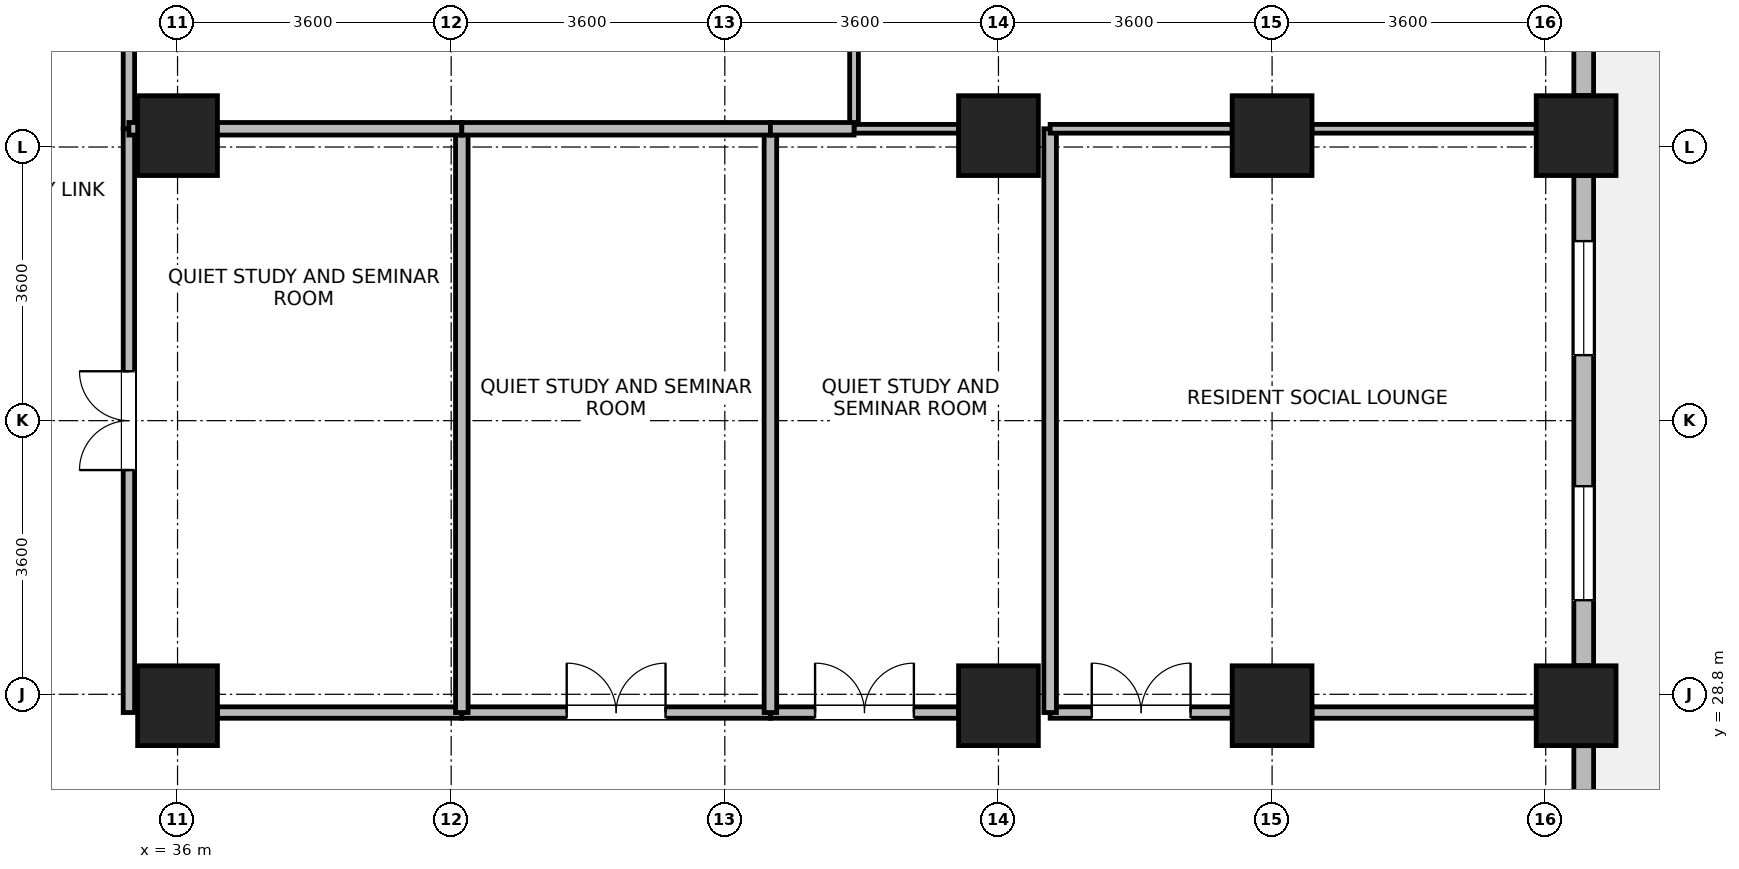
"""IFC4 building model, lengths in metres.
Left out: names, types, materials, properties, quantities, classifications, styles, units other than length and angle.
Written with IfcOpenShell. Run it as: python <this file> out.ifc"""

import sys

from ifc_helpers import new_model, si_unit, direction, frame, frame_2d, origin, origin_2d, place, context, subcontext, project, spatial, rectangle, extrude, source, transform, mapped, element, fill, save


model = new_model("IFC4")
c1 = context("Model", 3, precision=1e-05, world=origin(), true_north=direction((0.0, 1.0)))
c2 = subcontext(c1, "Body", "Model", "MODEL_VIEW")
j1 = project(units=[si_unit("LENGTHUNIT", "METRE"), si_unit("PLANEANGLEUNIT", "RADIAN")], contexts=[c1])
p1 = place(None, origin())
s1 = spatial("IfcSite", under=j1, at=p1, CompositionType="ELEMENT")
p2 = place(p1, origin())
s2 = spatial("IfcBuilding", under=s1, at=p2, CompositionType="ELEMENT")
p3 = place(p2, frame((0.0, 0.0, 166.1)))
s3 = spatial("IfcBuildingStorey", under=s2, at=p3, CompositionType="ELEMENT", Elevation=166.1)
m1 = source(origin(), c2, "Body", "SweptSolid", [
    extrude(rectangle(XDim=1.05, YDim=1.05, at=origin_2d()), origin(), (0.0, 0.0, 1.0), 3.7),
])
for number, where, z_axis, x_axis in (
    (1, (36.0, 28.65, 0.0), (0.0, 0.0, 1.0), (1.0, 0.0, 0.0)),
    (2, (36.0, 36.15, 0.0), (0.0, 0.0, 1.0), (1.0, 0.0, 0.0)),
    (3, (46.8, 28.65, 0.0), (0.0, 0.0, 1.0), (1.0, 0.0, 0.0)),
    (4, (46.8, 36.15, 0.0), (0.0, 0.0, 1.0), (1.0, 0.0, 0.0)),
    (5, (50.4, 28.65, 0.0), (0.0, 0.0, 1.0), (1.0, 0.0, 0.0)),
    (6, (50.4, 36.15, 0.0), (0.0, 0.0, 1.0), (1.0, 0.0, 0.0)),
    (7, (54.4, 28.65, 0.0), (0.0, 0.0, 1.0), (1.0, 0.0, 0.0)),
    (8, (54.4, 36.15, 0.0), (0.0, 0.0, 1.0), (1.0, 0.0, 0.0)),
):
    element("IfcColumn", number, at=place(p3, frame(where, z_axis=z_axis, x_axis=x_axis)), inside=s3, PredefinedType="COLUMN", context=c2, shape_type="MappedRepresentation", body=[
        mapped(m1, transform((0.0, 0.0, 0.0), x_axis=(1.0, 0.0, 0.0), y_axis=(0.0, 1.0, 0.0), z_axis=(0.0, 0.0, 1.0), scale=1.0)),
    ])
p4 = place(p3, frame((54.5, 28.124, 0.0), z_axis=(0.0, 0.0, 1.0), x_axis=(0.0, -1.0, 0.0)))
e9 = element("IfcWall", 9, at=p4, inside=s3, PredefinedType="STANDARD", context=c2, shape_type="SweptSolid", body=[
    extrude(rectangle(XDim=5.998, YDim=0.26, at=frame_2d((2.999, 0.0))), origin(), (0.0, 0.0, 1.0), 2.99),
])
p5 = place(p4, frame((3.749, 0.0, 0.85)))
e10 = element("IfcOpeningElement", 10, at=p5, cuts=e9, PredefinedType="OPENING", context=c2, shape_type="SweptSolid", body=[
    extrude(rectangle(XDim=1.5, YDim=1.85, at=frame_2d((0.75, 0.925))), frame((0.0, 0.14, 0.0), z_axis=(0.0, -1.0, 0.0), x_axis=(1.0, 0.0, 0.0)), (0.0, 0.0, 1.0), 0.28),
])
p6 = place(p4, frame((2.044, 0.0, 0.85)))
e11 = element("IfcOpeningElement", 11, at=p6, cuts=e9, PredefinedType="OPENING", context=c2, shape_type="SweptSolid", body=[
    extrude(rectangle(XDim=0.95, YDim=1.75, at=frame_2d((0.475, 0.875))), frame((0.0, 0.14, 0.0), z_axis=(0.0, -1.0, 0.0), x_axis=(1.0, 0.0, 0.0)), (0.0, 0.0, 1.0), 0.28),
])
p7 = place(p3, frame((54.5, 35.624, 0.0), z_axis=(0.0, 0.0, 1.0), x_axis=(0.0, -1.0, 0.0)))
e12 = element("IfcWall", 12, at=p7, inside=s3, PredefinedType="STANDARD", context=c2, shape_type="SweptSolid", body=[
    extrude(rectangle(XDim=6.448, YDim=0.26, at=frame_2d((3.224, 0.0))), origin(), (0.0, 0.0, 1.0), 2.99),
])
p8 = place(p7, frame((0.862, 0.0, 0.85)))
e13 = element("IfcOpeningElement", 13, at=p8, cuts=e12, PredefinedType="OPENING", context=c2, shape_type="SweptSolid", body=[
    extrude(rectangle(XDim=1.5, YDim=1.85, at=frame_2d((0.75, 0.925))), frame((0.0, 0.14, 0.0), z_axis=(0.0, -1.0, 0.0), x_axis=(1.0, 0.0, 0.0)), (0.0, 0.0, 1.0), 0.28),
])
p9 = place(p7, frame((4.086, 0.0, 0.85)))
e14 = element("IfcOpeningElement", 14, at=p9, cuts=e12, PredefinedType="OPENING", context=c2, shape_type="SweptSolid", body=[
    extrude(rectangle(XDim=1.5, YDim=1.85, at=frame_2d((0.75, 0.925))), frame((0.0, 0.14, 0.0), z_axis=(0.0, -1.0, 0.0), x_axis=(1.0, 0.0, 0.0)), (0.0, 0.0, 1.0), 0.28),
])
p10 = place(p3, frame((54.5, 39.73, 0.0), z_axis=(0.0, 0.0, 1.0), x_axis=(0.0, -1.0, 0.0)))
e15 = element("IfcWall", 15, at=p10, inside=s3, PredefinedType="STANDARD", context=c2, shape_type="SweptSolid", body=[
    extrude(rectangle(XDim=3.054, YDim=0.26, at=frame_2d((1.527, 0.0))), origin(), (0.0, 0.0, 1.0), 3.44),
])
p11 = place(p10, frame((0.777, 0.0, 0.85)))
e16 = element("IfcOpeningElement", 16, at=p11, cuts=e15, PredefinedType="OPENING", context=c2, shape_type="SweptSolid", body=[
    extrude(rectangle(XDim=1.5, YDim=1.85, at=frame_2d((0.75, 0.925))), frame((0.0, 0.14, 0.0), z_axis=(0.0, -1.0, 0.0), x_axis=(1.0, 0.0, 0.0)), (0.0, 0.0, 1.0), 0.28),
])
p12 = place(p3, frame((35.36, 28.56, 0.0), z_axis=(0.0, 0.0, 1.0), x_axis=(0.0, 1.0, 0.0)))
e17 = element("IfcWall", 17, at=p12, inside=s3, PredefinedType="PARTITIONING", context=c2, shape_type="SweptSolid", body=[
    extrude(rectangle(XDim=7.68, YDim=0.15, at=frame_2d((3.84, 0.0))), origin(), (0.0, 0.0, 1.0), 3.44),
])
p13 = place(p12, frame((3.19, 0.0, 0.0)))
e18 = element("IfcOpeningElement", 18, at=p13, cuts=e17, PredefinedType="OPENING", context=c2, shape_type="SweptSolid", body=[
    extrude(rectangle(XDim=1.3, YDim=2.12, at=frame_2d((0.65, 1.06))), frame((0.0, 0.085, 0.0), z_axis=(0.0, -1.0, 0.0), x_axis=(1.0, 0.0, 0.0)), (0.0, 0.0, 1.0), 0.17),
])
p14 = place(p3, frame((47.48, 28.56, 0.0), z_axis=(0.0, 0.0, 1.0), x_axis=(1.0, 0.0, 0.0)))
e19 = element("IfcWall", 19, at=p14, inside=s3, PredefinedType="PARTITIONING", context=c2, shape_type="SweptSolid", body=[
    extrude(rectangle(XDim=2.395, YDim=0.15, at=frame_2d((1.198, 0.0))), origin(), (0.0, 0.0, 1.0), 2.84),
])
p15 = place(p14, frame((0.548, 0.0, 0.0)))
e20 = element("IfcOpeningElement", 20, at=p15, cuts=e19, PredefinedType="OPENING", context=c2, shape_type="SweptSolid", body=[
    extrude(rectangle(XDim=1.3, YDim=2.12, at=frame_2d((0.65, 1.06))), frame((0.0, 0.085, 0.0), z_axis=(0.0, -1.0, 0.0), x_axis=(1.0, 0.0, 0.0)), (0.0, 0.0, 1.0), 0.17),
])
p16 = place(p3, frame((50.925, 28.56, 0.0), z_axis=(0.0, 0.0, 1.0), x_axis=(1.0, 0.0, 0.0)))
e21 = element("IfcWall", 21, at=p16, inside=s3, PredefinedType="PARTITIONING", context=c2, shape_type="SweptSolid", body=[
    extrude(rectangle(XDim=2.95, YDim=0.15, at=frame_2d((1.475, 0.0))), origin(), (0.0, 0.0, 1.0), 2.84),
])
p17 = place(p3, frame((36.525, 28.56, 0.0), z_axis=(0.0, 0.0, 1.0), x_axis=(1.0, 0.0, 0.0)))
e22 = element("IfcWall", 22, at=p17, inside=s3, PredefinedType="PARTITIONING", context=c2, shape_type="SweptSolid", body=[
    extrude(rectangle(XDim=3.215, YDim=0.15, at=frame_2d((1.607, 0.0))), origin(), (0.0, 0.0, 1.0), 2.84),
])
p18 = place(p3, frame((39.74, 28.56, 0.0), z_axis=(0.0, 0.0, 1.0), x_axis=(1.0, 0.0, 0.0)))
e23 = element("IfcWall", 23, at=p18, inside=s3, PredefinedType="PARTITIONING", context=c2, shape_type="SweptSolid", body=[
    extrude(rectangle(XDim=4.06, YDim=0.15, at=frame_2d((2.03, 0.0))), origin(), (0.0, 0.0, 1.0), 2.84),
])
p19 = place(p18, frame((1.38, 0.0, 0.0)))
e24 = element("IfcOpeningElement", 24, at=p19, cuts=e23, PredefinedType="OPENING", context=c2, shape_type="SweptSolid", body=[
    extrude(rectangle(XDim=1.3, YDim=2.12, at=frame_2d((0.65, 1.06))), frame((0.0, 0.085, 0.0), z_axis=(0.0, -1.0, 0.0), x_axis=(1.0, 0.0, 0.0)), (0.0, 0.0, 1.0), 0.17),
])
p20 = place(p3, frame((43.8, 28.56, 0.0), z_axis=(0.0, 0.0, 1.0), x_axis=(1.0, 0.0, 0.0)))
e25 = element("IfcWall", 25, at=p20, inside=s3, PredefinedType="PARTITIONING", context=c2, shape_type="SweptSolid", body=[
    extrude(rectangle(XDim=2.475, YDim=0.15, at=frame_2d((1.237, 0.0))), origin(), (0.0, 0.0, 1.0), 2.84),
])
p21 = place(p20, frame((0.587, 0.0, 0.0)))
e26 = element("IfcOpeningElement", 26, at=p21, cuts=e25, PredefinedType="OPENING", context=c2, shape_type="SweptSolid", body=[
    extrude(rectangle(XDim=1.3, YDim=2.12, at=frame_2d((0.65, 1.06))), frame((0.0, 0.085, 0.0), z_axis=(0.0, -1.0, 0.0), x_axis=(1.0, 0.0, 0.0)), (0.0, 0.0, 1.0), 0.17),
])
p22 = place(p3, frame((35.36, 36.24, 0.0), z_axis=(0.0, 0.0, 1.0), x_axis=(0.0, 1.0, 0.0)))
e27 = element("IfcWall", 27, at=p22, inside=s3, PredefinedType="PARTITIONING", context=c2, shape_type="SweptSolid", body=[
    extrude(rectangle(XDim=1.96, YDim=0.15, at=frame_2d((0.98, 0.0))), origin(), (0.0, 0.0, 1.0), 3.44),
])
for number, where, z_axis, x_axis in (
    (28, (39.74, 28.56, 0.0), (0.0, 0.0, 1.0), (0.0, 1.0, 0.0)),
    (29, (43.8, 28.56, 0.0), (0.0, 0.0, 1.0), (0.0, 1.0, 0.0)),
    (30, (47.48, 28.56, 0.0), (0.0, 0.0, 1.0), (0.0, 1.0, 0.0)),
):
    element("IfcWall", number, at=place(p3, frame(where, z_axis=z_axis, x_axis=x_axis)), inside=s3, PredefinedType="PARTITIONING", context=c2, shape_type="SweptSolid", body=[
        extrude(rectangle(XDim=7.68, YDim=0.165, at=frame_2d((3.84, 0.0))), origin(), (0.0, 0.0, 1.0), 3.44),
    ])
p23 = place(p3, frame((47.48, 36.24, 0.0), z_axis=(0.0, 0.0, 1.0), x_axis=(1.0, 0.0, 0.0)))
e31 = element("IfcWall", 31, at=p23, inside=s3, PredefinedType="PARTITIONING", context=c2, shape_type="SweptSolid", body=[
    extrude(rectangle(XDim=2.395, YDim=0.115, at=frame_2d((1.198, 0.0))), origin(), (0.0, 0.0, 1.0), 2.84),
])
p24 = place(p3, frame((50.925, 36.24, 0.0), z_axis=(0.0, 0.0, 1.0), x_axis=(1.0, 0.0, 0.0)))
e32 = element("IfcWall", 32, at=p24, inside=s3, PredefinedType="PARTITIONING", context=c2, shape_type="SweptSolid", body=[
    extrude(rectangle(XDim=2.95, YDim=0.115, at=frame_2d((1.475, 0.0))), origin(), (0.0, 0.0, 1.0), 2.84),
])
p25 = place(p3, frame((44.9, 36.24, 0.0), z_axis=(0.0, 0.0, 1.0), x_axis=(0.0, 1.0, 0.0)))
e33 = element("IfcWall", 33, at=p25, inside=s3, PredefinedType="PARTITIONING", context=c2, shape_type="SweptSolid", body=[
    extrude(rectangle(XDim=3.228, YDim=0.115, at=frame_2d((1.614, 0.0))), origin(), (0.0, 0.0, 1.0), 3.44),
])
p26 = place(p3, frame((35.36, 36.24, 0.0), z_axis=(0.0, 0.0, 1.0), x_axis=(1.0, 0.0, 0.0)))
e34 = element("IfcWall", 34, at=p26, inside=s3, PredefinedType="PARTITIONING", context=c2, shape_type="SweptSolid", body=[
    extrude(rectangle(XDim=4.38, YDim=0.165, at=frame_2d((2.19, 0.0))), origin(), (0.0, 0.0, 1.0), 2.84),
])
p27 = place(p3, frame((39.74, 36.24, 0.0), z_axis=(0.0, 0.0, 1.0), x_axis=(1.0, 0.0, 0.0)))
e35 = element("IfcWall", 35, at=p27, inside=s3, PredefinedType="PARTITIONING", context=c2, shape_type="SweptSolid", body=[
    extrude(rectangle(XDim=4.06, YDim=0.165, at=frame_2d((2.03, 0.0))), origin(), (0.0, 0.0, 1.0), 2.84),
])
p28 = place(p3, frame((44.9, 36.24, 0.0), z_axis=(0.0, 0.0, 1.0), x_axis=(1.0, 0.0, 0.0)))
e36 = element("IfcWall", 36, at=p28, inside=s3, PredefinedType="PARTITIONING", context=c2, shape_type="SweptSolid", body=[
    extrude(rectangle(XDim=1.375, YDim=0.115, at=frame_2d((0.688, 0.0))), origin(), (0.0, 0.0, 1.0), 2.84),
])
p29 = place(p3, frame((43.8, 36.24, 0.0), z_axis=(0.0, 0.0, 1.0), x_axis=(1.0, 0.0, 0.0)))
e37 = element("IfcWall", 37, at=p29, inside=s3, PredefinedType="PARTITIONING", context=c2, shape_type="SweptSolid", body=[
    extrude(rectangle(XDim=1.1, YDim=0.165, at=frame_2d((0.55, 0.0))), origin(), (0.0, 0.0, 1.0), 2.84),
])
p30 = place(p8, origin())
e38 = element("IfcWindow", 38, at=p30, inside=s3, PartitioningType="SINGLE_PANEL", PredefinedType="WINDOW", context=c2, shape_type="SweptSolid", body=[
    extrude(rectangle(XDim=1.5, YDim=1.85, at=frame_2d((0.75, 0.925))), frame((0.0, 0.03, 0.0), z_axis=(0.0, -1.0, 0.0), x_axis=(1.0, 0.0, 0.0)), (0.0, 0.0, 1.0), 0.06),
])
fill(e13, e38)
p31 = place(p9, origin())
e39 = element("IfcWindow", 39, at=p31, inside=s3, PartitioningType="SINGLE_PANEL", PredefinedType="WINDOW", context=c2, shape_type="SweptSolid", body=[
    extrude(rectangle(XDim=1.5, YDim=1.85, at=frame_2d((0.75, 0.925))), frame((0.0, 0.03, 0.0), z_axis=(0.0, -1.0, 0.0), x_axis=(1.0, 0.0, 0.0)), (0.0, 0.0, 1.0), 0.06),
])
fill(e14, e39)
p32 = place(p13, origin())
e40 = element("IfcDoor", 40, at=p32, inside=s3, OperationType="DOUBLE_DOOR_SINGLE_SWING", PredefinedType="DOOR", context=c2, shape_type="SweptSolid", body=[
    extrude(rectangle(XDim=1.3, YDim=2.12, at=frame_2d((0.65, 1.06))), frame((0.0, 0.025, 0.0), z_axis=(0.0, -1.0, 0.0), x_axis=(1.0, 0.0, 0.0)), (0.0, 0.0, 1.0), 0.05),
])
fill(e18, e40)
p33 = place(p15, origin())
e41 = element("IfcDoor", 41, at=p33, inside=s3, OperationType="DOUBLE_DOOR_SINGLE_SWING", PredefinedType="DOOR", context=c2, shape_type="SweptSolid", body=[
    extrude(rectangle(XDim=1.3, YDim=2.12, at=frame_2d((0.65, 1.06))), frame((0.0, 0.025, 0.0), z_axis=(0.0, -1.0, 0.0), x_axis=(1.0, 0.0, 0.0)), (0.0, 0.0, 1.0), 0.05),
])
fill(e20, e41)
p34 = place(p19, origin())
e42 = element("IfcDoor", 42, at=p34, inside=s3, OperationType="DOUBLE_DOOR_SINGLE_SWING", PredefinedType="DOOR", context=c2, shape_type="SweptSolid", body=[
    extrude(rectangle(XDim=1.3, YDim=2.12, at=frame_2d((0.65, 1.06))), frame((0.0, 0.025, 0.0), z_axis=(0.0, -1.0, 0.0), x_axis=(1.0, 0.0, 0.0)), (0.0, 0.0, 1.0), 0.05),
])
fill(e24, e42)
p35 = place(p21, origin())
e43 = element("IfcDoor", 43, at=p35, inside=s3, OperationType="DOUBLE_DOOR_SINGLE_SWING", PredefinedType="DOOR", context=c2, shape_type="SweptSolid", body=[
    extrude(rectangle(XDim=1.3, YDim=2.12, at=frame_2d((0.65, 1.06))), frame((0.0, 0.025, 0.0), z_axis=(0.0, -1.0, 0.0), x_axis=(1.0, 0.0, 0.0)), (0.0, 0.0, 1.0), 0.05),
])
fill(e26, e43)
save(model, sys.argv[1])
